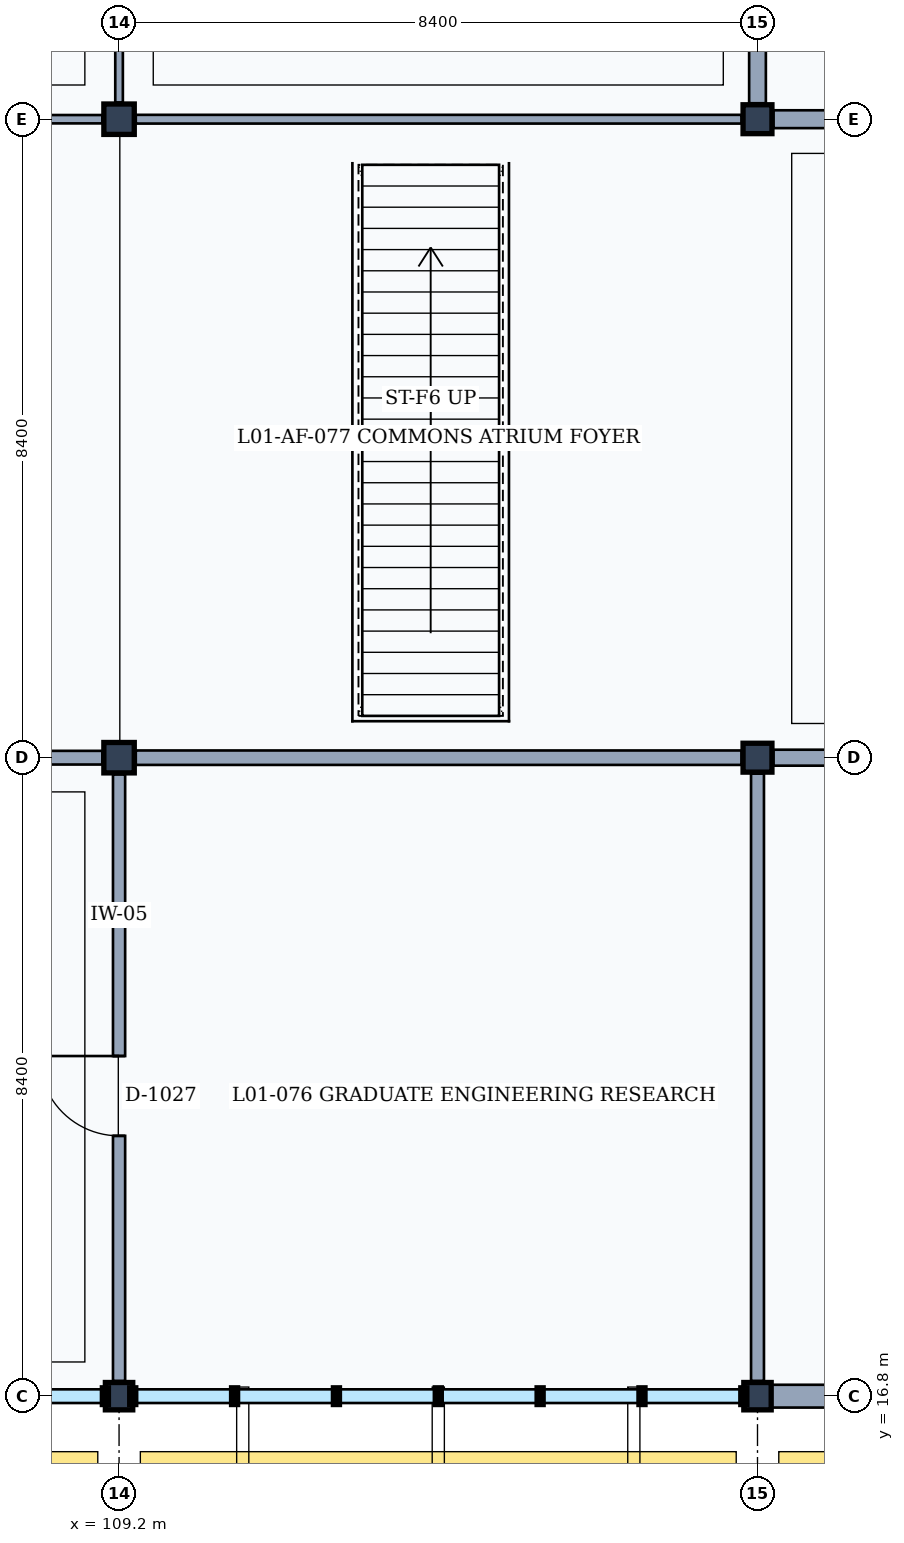
"""IFC4 building model, lengths in metres.
Left out: names, types, materials, properties, quantities, classifications, styles, units other than length and angle.
Written with IfcOpenShell. Run it as: python <this file> out.ifc"""

import sys

from ifc_helpers import new_model, si_unit, direction, frame, frame_2d, origin, origin_2d, place, context, subcontext, project, spatial, rectangle, extrude, element, fill, save


model = new_model("IFC4")
c1 = context("Model", 3, precision=1e-05, world=origin(), true_north=direction((0.0, 1.0)))
c2 = subcontext(c1, "Body", "Model", "MODEL_VIEW")
j1 = project(units=[si_unit("LENGTHUNIT", "METRE"), si_unit("PLANEANGLEUNIT", "RADIAN")], contexts=[c1])
p1 = place(None, origin())
s1 = spatial("IfcSite", under=j1, at=p1, CompositionType="ELEMENT")
p2 = place(p1, origin())
s2 = spatial("IfcBuilding", under=s1, at=p2, CompositionType="ELEMENT")
p3 = place(p2, frame((0.0, 0.0, 4.8)))
s3 = spatial("IfcBuildingStorey", under=s2, at=p3, CompositionType="ELEMENT", Elevation=4.8)
p4 = place(p3, frame((109.2, 16.8, 0.0), z_axis=(0.0, 0.0, 1.0), x_axis=(1.0, 0.0, 0.0)))
e1 = element("IfcColumn", 1, at=p4, inside=s3, PredefinedType="COLUMN", context=c2, shape_type="SweptSolid", body=[
    extrude(rectangle(XDim=0.36, YDim=0.36, at=origin_2d()), origin(), (0.0, 0.0, 1.0), 4.8),
])
for number, where, z_axis, x_axis in (
    (2, (109.2, 25.2, 0.0), (0.0, 0.0, 1.0), (1.0, 0.0, 0.0)),
    (3, (109.2, 33.6, 0.0), (0.0, 0.0, 1.0), (1.0, 0.0, 0.0)),
):
    element("IfcColumn", number, at=place(p3, frame(where, z_axis=z_axis, x_axis=x_axis)), inside=s3, PredefinedType="COLUMN", context=c2, shape_type="SweptSolid", body=[
        extrude(rectangle(XDim=0.4, YDim=0.4, at=origin_2d()), origin(), (0.0, 0.0, 1.0), 4.8),
    ])
p5 = place(p3, frame((117.6, 16.8, 0.0), z_axis=(0.0, 0.0, 1.0), x_axis=(1.0, 0.0, 0.0)))
e4 = element("IfcColumn", 4, at=p5, inside=s3, PredefinedType="COLUMN", context=c2, shape_type="SweptSolid", body=[
    extrude(rectangle(XDim=0.36, YDim=0.36, at=origin_2d()), origin(), (0.0, 0.0, 1.0), 4.8),
])
for number, where, z_axis, x_axis in (
    (5, (117.6, 25.2, 0.0), (0.0, 0.0, 1.0), (1.0, 0.0, 0.0)),
    (6, (117.6, 33.6, 0.0), (0.0, 0.0, 1.0), (1.0, 0.0, 0.0)),
):
    element("IfcColumn", number, at=place(p3, frame(where, z_axis=z_axis, x_axis=x_axis)), inside=s3, PredefinedType="COLUMN", context=c2, shape_type="SweptSolid", body=[
        extrude(rectangle(XDim=0.38, YDim=0.38, at=origin_2d()), origin(), (0.0, 0.0, 1.0), 4.8),
    ])
p6 = place(p3, frame((125.82, 16.8, 0.0), z_axis=(0.0, 0.0, 1.0), x_axis=(-1.0, 0.0, 0.0)))
e7 = element("IfcWall", 7, at=p6, inside=s3, PredefinedType="SOLIDWALL", context=c2, shape_type="SweptSolid", body=[
    extrude(rectangle(XDim=8.04, YDim=0.3, at=frame_2d((4.02, 0.0))), origin(), (0.0, 0.0, 1.0), 3.96),
])
p7 = place(p6, frame((2.87, 0.0, 0.9)))
e8 = element("IfcOpeningElement", 8, at=p7, cuts=e7, PredefinedType="OPENING", context=c2, shape_type="SweptSolid", body=[
    extrude(rectangle(XDim=2.3, YDim=1.5, at=frame_2d((1.15, 0.75))), frame((0.0, 0.16, 0.0), z_axis=(0.0, -1.0, 0.0), x_axis=(1.0, 0.0, 0.0)), (0.0, 0.0, 1.0), 0.32),
])
p8 = place(p3, frame((109.2, 17.0, 0.0), z_axis=(0.0, 0.0, 1.0), x_axis=(0.0, 1.0, 0.0)))
e9 = element("IfcWall", 9, at=p8, inside=s3, PredefinedType="PARTITIONING", context=c2, shape_type="SweptSolid", body=[
    extrude(rectangle(XDim=7.98, YDim=0.16, at=frame_2d((3.99, 0.0))), origin(), (0.0, 0.0, 1.0), 3.92),
])
p9 = place(p8, frame((3.225, 0.0, 0.0)))
e10 = element("IfcOpeningElement", 10, at=p9, cuts=e9, PredefinedType="OPENING", context=c2, shape_type="SweptSolid", body=[
    extrude(rectangle(XDim=1.05, YDim=2.2, at=frame_2d((0.525, 1.1))), frame((0.0, 0.09, 0.0), z_axis=(0.0, -1.0, 0.0), x_axis=(1.0, 0.0, 0.0)), (0.0, 0.0, 1.0), 0.18),
])
p10 = place(p3, frame((101.01, 25.2, 0.0), z_axis=(0.0, 0.0, 1.0), x_axis=(1.0, 0.0, 0.0)))
e11 = element("IfcWall", 11, at=p10, inside=s3, PredefinedType="PARTITIONING", context=c2, shape_type="SweptSolid", body=[
    extrude(rectangle(XDim=7.97, YDim=0.18, at=frame_2d((3.985, 0.0))), origin(), (0.0, 0.0, 1.0), 3.89),
])
p11 = place(p10, frame((3.175, 0.0, 0.0)))
e12 = element("IfcOpeningElement", 12, at=p11, cuts=e11, PredefinedType="OPENING", context=c2, shape_type="SweptSolid", body=[
    extrude(rectangle(XDim=1.15, YDim=2.25, at=frame_2d((0.575, 1.125))), frame((0.0, 0.1, 0.0), z_axis=(0.0, -1.0, 0.0), x_axis=(1.0, 0.0, 0.0)), (0.0, 0.0, 1.0), 0.2),
])
p12 = place(p3, frame((101.01, 33.6, 0.0), z_axis=(0.0, 0.0, 1.0), x_axis=(1.0, 0.0, 0.0)))
e13 = element("IfcWall", 13, at=p12, inside=s3, PredefinedType="PARTITIONING", context=c2, shape_type="SweptSolid", body=[
    extrude(rectangle(XDim=7.97, YDim=0.11, at=frame_2d((3.985, 0.0))), origin(), (0.0, 0.0, 1.0), 3.92),
])
p13 = place(p12, frame((3.1, 0.0, 0.0)))
e14 = element("IfcOpeningElement", 14, at=p13, cuts=e13, PredefinedType="OPENING", context=c2, shape_type="SweptSolid", body=[
    extrude(rectangle(XDim=1.3, YDim=2.2, at=frame_2d((0.65, 1.1))), frame((0.0, 0.065, 0.0), z_axis=(0.0, -1.0, 0.0), x_axis=(1.0, 0.0, 0.0)), (0.0, 0.0, 1.0), 0.13),
])
p14 = place(p3, frame((109.2, 33.82, 0.0), z_axis=(0.0, 0.0, 1.0), x_axis=(0.0, 1.0, 0.0)))
e15 = element("IfcWall", 15, at=p14, inside=s3, PredefinedType="MOVABLE", context=c2, shape_type="SweptSolid", body=[
    extrude(rectangle(XDim=7.96, YDim=0.1, at=frame_2d((3.98, 0.0))), origin(), (0.0, 0.0, 1.0), 3.92),
])
p15 = place(p14, frame((2.975, 0.0, 0.0)))
e16 = element("IfcOpeningElement", 16, at=p15, cuts=e15, PredefinedType="OPENING", context=c2, shape_type="SweptSolid", body=[
    extrude(rectangle(XDim=1.55, YDim=2.35, at=frame_2d((0.775, 1.175))), frame((0.0, 0.06, 0.0), z_axis=(0.0, -1.0, 0.0), x_axis=(1.0, 0.0, 0.0)), (0.0, 0.0, 1.0), 0.12),
])
p16 = place(p3, frame((117.6, 17.0, 0.0), z_axis=(0.0, 0.0, 1.0), x_axis=(0.0, 1.0, 0.0)))
e17 = element("IfcWall", 17, at=p16, inside=s3, PredefinedType="PARTITIONING", context=c2, shape_type="SweptSolid", body=[
    extrude(rectangle(XDim=7.99, YDim=0.17, at=frame_2d((3.995, 0.0))), origin(), (0.0, 0.0, 1.0), 3.92),
])
p17 = place(p3, frame((109.42, 25.2, 0.0), z_axis=(0.0, 0.0, 1.0), x_axis=(1.0, 0.0, 0.0)))
e18 = element("IfcWall", 18, at=p17, inside=s3, PredefinedType="PARTITIONING", context=c2, shape_type="SweptSolid", body=[
    extrude(rectangle(XDim=7.97, YDim=0.19, at=frame_2d((3.985, 0.0))), origin(), (0.0, 0.0, 1.0), 3.89),
])
p18 = place(p3, frame((109.42, 33.6, 0.0), z_axis=(0.0, 0.0, 1.0), x_axis=(1.0, 0.0, 0.0)))
e19 = element("IfcWall", 19, at=p18, inside=s3, PredefinedType="PARTITIONING", context=c2, shape_type="SweptSolid", body=[
    extrude(rectangle(XDim=7.97, YDim=0.115, at=frame_2d((3.985, 0.0))), origin(), (0.0, 0.0, 1.0), 3.92),
])
p19 = place(p3, frame((117.6, 33.81, 0.0), z_axis=(0.0, 0.0, 1.0), x_axis=(0.0, 1.0, 0.0)))
e20 = element("IfcWall", 20, at=p19, inside=s3, PredefinedType="PARTITIONING", context=c2, shape_type="SweptSolid", body=[
    extrude(rectangle(XDim=7.98, YDim=0.22, at=frame_2d((3.99, 0.0))), origin(), (0.0, 0.0, 1.0), 3.92),
])
p20 = place(p3, frame((117.81, 25.2, 0.0), z_axis=(0.0, 0.0, 1.0), x_axis=(1.0, 0.0, 0.0)))
e21 = element("IfcWall", 21, at=p20, inside=s3, PredefinedType="PARTITIONING", context=c2, shape_type="SweptSolid", body=[
    extrude(rectangle(XDim=7.97, YDim=0.21, at=frame_2d((3.985, 0.0))), origin(), (0.0, 0.0, 1.0), 3.89),
])
p21 = place(p20, frame((3.3, 0.0, 0.0)))
e22 = element("IfcOpeningElement", 22, at=p21, cuts=e21, PredefinedType="OPENING", context=c2, shape_type="SweptSolid", body=[
    extrude(rectangle(XDim=0.9, YDim=2.1, at=frame_2d((0.45, 1.05))), frame((0.0, 0.115, 0.0), z_axis=(0.0, -1.0, 0.0), x_axis=(1.0, 0.0, 0.0)), (0.0, 0.0, 1.0), 0.23),
])
p22 = place(p3, frame((117.81, 33.6, 0.0), z_axis=(0.0, 0.0, 1.0), x_axis=(1.0, 0.0, 0.0)))
e23 = element("IfcWall", 23, at=p22, inside=s3, PredefinedType="PARTITIONING", context=c2, shape_type="SweptSolid", body=[
    extrude(rectangle(XDim=7.97, YDim=0.235, at=frame_2d((3.985, 0.0))), origin(), (0.0, 0.0, 1.0), 3.89),
])
p23 = place(p22, frame((3.125, 0.0, 0.0)))
e24 = element("IfcOpeningElement", 24, at=p23, cuts=e23, PredefinedType="OPENING", context=c2, shape_type="SweptSolid", body=[
    extrude(rectangle(XDim=1.25, YDim=2.3, at=frame_2d((0.625, 1.15))), frame((0.0, 0.127, 0.0), z_axis=(0.0, -1.0, 0.0), x_axis=(1.0, 0.0, 0.0)), (0.0, 0.0, 1.0), 0.255),
])
p24 = place(p9, origin())
e25 = element("IfcDoor", 25, at=p24, inside=s3, OperationType="SINGLE_SWING_RIGHT", PredefinedType="DOOR", context=c2, shape_type="SweptSolid", body=[
    extrude(rectangle(XDim=1.05, YDim=2.2, at=frame_2d((0.525, 1.1))), frame((0.0, 0.025, 0.0), z_axis=(0.0, -1.0, 0.0), x_axis=(1.0, 0.0, 0.0)), (0.0, 0.0, 1.0), 0.05),
])
fill(e10, e25)
save(model, sys.argv[1])
